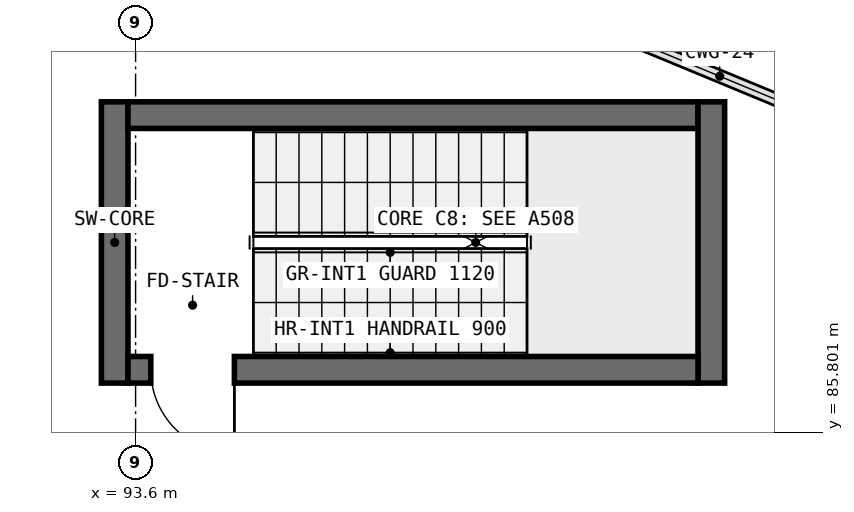
"""IFC4 building model, lengths in metres.
Left out: names, types, materials, properties, quantities, classifications, styles, units other than length and angle.
Written with IfcOpenShell. Run it as: python <this file> out.ifc"""

import sys

from ifc_helpers import new_model, si_unit, direction, frame, frame_2d, origin, place, context, subcontext, project, spatial, rectangle, extrude, element, fill, save


model = new_model("IFC4")
c1 = context("Model", 3, precision=1e-05, world=origin(), true_north=direction((0.0, 1.0)))
c2 = subcontext(c1, "Body", "Model", "MODEL_VIEW")
j1 = project(units=[si_unit("LENGTHUNIT", "METRE"), si_unit("PLANEANGLEUNIT", "RADIAN")], contexts=[c1])
p1 = place(None, origin())
s1 = spatial("IfcSite", under=j1, at=p1, CompositionType="ELEMENT")
p2 = place(p1, origin())
s2 = spatial("IfcBuilding", under=s1, at=p2, CompositionType="ELEMENT")
p3 = place(p2, frame((0.0, 0.0, 5.25)))
s3 = spatial("IfcBuildingStorey", under=s2, at=p3, CompositionType="ELEMENT", Elevation=5.25)
p4 = place(p3, frame((93.325, 86.45, 0.0), z_axis=(0.0, 0.0, 1.0), x_axis=(0.0, 1.0, 0.0)))
e1 = element("IfcWall", 1, at=p4, inside=s3, PredefinedType="SHEAR", context=c2, shape_type="SweptSolid", body=[
    extrude(rectangle(XDim=3.7, YDim=0.35, at=frame_2d((1.85, 0.0))), origin(), (0.0, 0.0, 1.0), 4.55),
])
p5 = place(p3, frame((93.5, 89.975, 0.0), z_axis=(0.0, 0.0, 1.0), x_axis=(1.0, 0.0, 0.0)))
e2 = element("IfcWall", 2, at=p5, inside=s3, PredefinedType="SHEAR", context=c2, shape_type="SweptSolid", body=[
    extrude(rectangle(XDim=7.5, YDim=0.35, at=frame_2d((3.75, 0.0))), origin(), (0.0, 0.0, 1.0), 4.55),
])
p6 = place(p3, frame((101.175, 90.15, 0.0), z_axis=(0.0, 0.0, 1.0), x_axis=(0.0, -1.0, 0.0)))
e3 = element("IfcWall", 3, at=p6, inside=s3, PredefinedType="SHEAR", context=c2, shape_type="SweptSolid", body=[
    extrude(rectangle(XDim=3.7, YDim=0.35, at=frame_2d((1.85, 0.0))), origin(), (0.0, 0.0, 1.0), 4.55),
])
p7 = place(p3, frame((101.0, 86.625, 0.0), z_axis=(0.0, 0.0, 1.0), x_axis=(-1.0, 0.0, 0.0)))
e4 = element("IfcWall", 4, at=p7, inside=s3, PredefinedType="SHEAR", context=c2, shape_type="SweptSolid", body=[
    extrude(rectangle(XDim=7.5, YDim=0.35, at=frame_2d((3.75, 0.0))), origin(), (0.0, 0.0, 1.0), 4.55),
])
p8 = place(p7, frame((6.1, 0.0, 0.0)))
e5 = element("IfcOpeningElement", 5, at=p8, cuts=e4, PredefinedType="OPENING", context=c2, shape_type="SweptSolid", body=[
    extrude(rectangle(XDim=1.1, YDim=2.15, at=frame_2d((0.55, 1.075))), frame((0.0, 0.185, 0.0), z_axis=(0.0, -1.0, 0.0), x_axis=(1.0, 0.0, 0.0)), (0.0, 0.0, 1.0), 0.37),
])
p9 = place(p3, frame((106.325, 89.483, 0.0), z_axis=(0.0, 0.0, 1.0), x_axis=(-0.92385889973, 0.382733240508, 0.0)))
e6 = element("IfcWall", 6, at=p9, inside=s3, PredefinedType="SOLIDWALL", context=c2, shape_type="SweptSolid", body=[
    extrude(rectangle(XDim=10.081, YDim=0.29, at=frame_2d((5.04, 0.0))), origin(), (0.0, 0.0, 1.0), 4.37),
])
p10 = place(p9, frame((4.02, 0.0, 0.95)))
e7 = element("IfcOpeningElement", 7, at=p10, cuts=e6, PredefinedType="OPENING", context=c2, shape_type="SweptSolid", body=[
    extrude(rectangle(XDim=2.04, YDim=1.67, at=frame_2d((1.02, 0.835))), frame((0.0, 0.155, 0.0), z_axis=(0.0, -1.0, 0.0), x_axis=(1.0, 0.0, 0.0)), (0.0, 0.0, 1.0), 0.31),
])
p11 = place(p8, origin())
e8 = element("IfcDoor", 8, at=p11, inside=s3, OperationType="SINGLE_SWING_LEFT", PredefinedType="DOOR", context=c2, shape_type="SweptSolid", body=[
    extrude(rectangle(XDim=1.1, YDim=2.15, at=frame_2d((0.55, 1.075))), frame((0.0, 0.025, 0.0), z_axis=(0.0, -1.0, 0.0), x_axis=(1.0, 0.0, 0.0)), (0.0, 0.0, 1.0), 0.05),
])
fill(e5, e8)
save(model, sys.argv[1])
